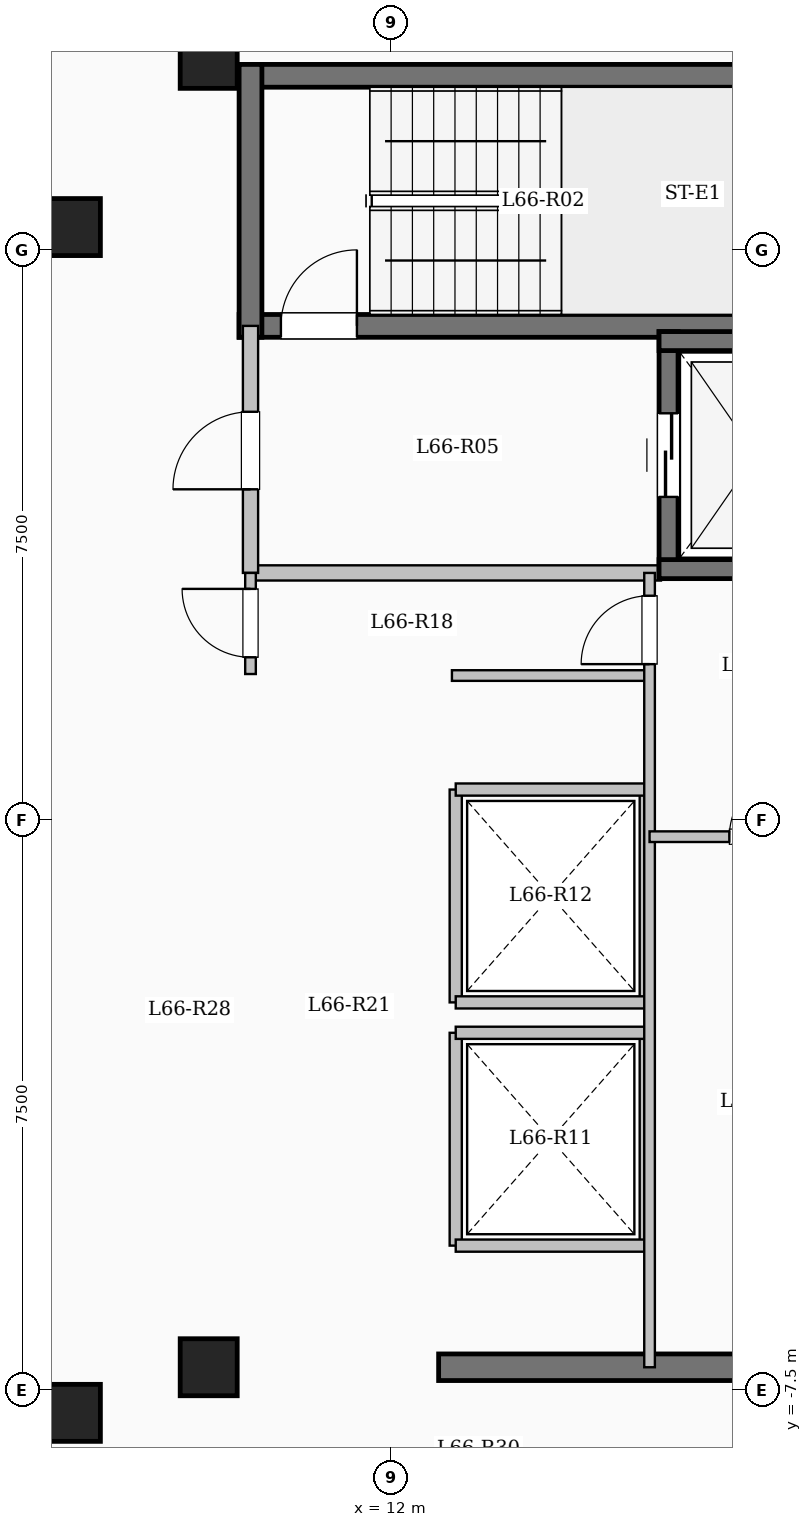
"""IFC4 building model, lengths in metres.
Left out: names, types, materials, properties, quantities, classifications, styles, units other than length and angle.
Written with IfcOpenShell. Run it as: python <this file> out.ifc"""

import sys

from ifc_helpers import new_model, si_unit, direction, frame, frame_2d, origin, origin_2d, place, context, subcontext, project, spatial, rectangle, extrude, element, fill, save


model = new_model("IFC4")
c1 = context("Model", 3, precision=1e-05, world=origin(), true_north=direction((0.0, 1.0)))
c2 = subcontext(c1, "Body", "Model", "MODEL_VIEW")
j1 = project(units=[si_unit("LENGTHUNIT", "METRE"), si_unit("PLANEANGLEUNIT", "RADIAN")], contexts=[c1])
p1 = place(None, origin())
s1 = spatial("IfcSite", under=j1, at=p1, CompositionType="ELEMENT")
p2 = place(p1, origin())
s2 = spatial("IfcBuilding", under=s1, at=p2, CompositionType="ELEMENT")
p3 = place(p2, frame((0.0, 0.0, 244.85)))
s3 = spatial("IfcBuildingStorey", under=s2, at=p3, CompositionType="ELEMENT", Elevation=244.85)
for number, where, z_axis, x_axis in (
    (1, (7.8, -7.8, 0.0), (0.0, 0.0, 1.0), (1.0, 0.0, 0.0)),
    (2, (7.8, 7.8, 0.0), (0.0, 0.0, 1.0), (1.0, 0.0, 0.0)),
    (3, (9.6, -7.2, 0.0), (0.0, 0.0, 1.0), (1.0, 0.0, 0.0)),
    (4, (9.6, 10.0, 0.0), (0.0, 0.0, 1.0), (1.0, 0.0, 0.0)),
):
    element("IfcColumn", number, at=place(p3, frame(where, z_axis=z_axis, x_axis=x_axis)), inside=s3, PredefinedType="COLUMN", context=c2, shape_type="SweptSolid", body=[
        extrude(rectangle(XDim=0.75, YDim=0.75, at=origin_2d()), origin(), (0.0, 0.0, 1.0), 3.35),
    ])
p4 = place(p3, frame((10.0, 9.79, 0.0), z_axis=(0.0, 0.0, 1.0), x_axis=(1.0, 0.0, 0.0)))
e5 = element("IfcWall", 5, at=p4, inside=s3, PredefinedType="SHEAR", context=c2, shape_type="SweptSolid", body=[
    extrude(rectangle(XDim=8.0, YDim=0.3, at=frame_2d((4.0, 0.0))), origin(), (0.0, 0.0, 1.0), 3.35),
])
p5 = place(p3, frame((10.0, 6.5, 0.0), z_axis=(0.0, 0.0, 1.0), x_axis=(1.0, 0.0, 0.0)))
e6 = element("IfcWall", 6, at=p5, inside=s3, PredefinedType="SHEAR", context=c2, shape_type="SweptSolid", body=[
    extrude(rectangle(XDim=8.0, YDim=0.3, at=frame_2d((4.0, 0.0))), origin(), (0.0, 0.0, 1.0), 3.35),
])
p6 = place(p5, frame((0.55, 0.0, 0.0)))
e7 = element("IfcOpeningElement", 7, at=p6, cuts=e6, PredefinedType="OPENING", context=c2, shape_type="SweptSolid", body=[
    extrude(rectangle(XDim=1.0, YDim=2.15, at=frame_2d((0.5, 1.075))), frame((0.0, 0.16, 0.0), z_axis=(0.0, -1.0, 0.0), x_axis=(1.0, 0.0, 0.0)), (0.0, 0.0, 1.0), 0.32),
])
p7 = place(p3, frame((10.15, 6.35, 0.0), z_axis=(0.0, 0.0, 1.0), x_axis=(0.0, 1.0, 0.0)))
e8 = element("IfcWall", 8, at=p7, inside=s3, PredefinedType="SHEAR", context=c2, shape_type="SweptSolid", body=[
    extrude(rectangle(XDim=3.59, YDim=0.3, at=frame_2d((1.795, 0.0))), origin(), (0.0, 0.0, 1.0), 3.35),
])
p8 = place(p3, frame((10.15, 3.25, 0.0), z_axis=(0.0, 0.0, 1.0), x_axis=(1.0, 0.0, 0.0)))
e9 = element("IfcWall", 9, at=p8, inside=s3, PredefinedType="SOLIDWALL", context=c2, shape_type="SweptSolid", body=[
    extrude(rectangle(XDim=5.4, YDim=0.2, at=frame_2d((2.7, 0.0))), origin(), (0.0, 0.0, 1.0), 3.1),
])
p9 = place(p3, frame((10.15, 3.25, 0.0), z_axis=(0.0, 0.0, 1.0), x_axis=(0.0, 1.0, 0.0)))
e10 = element("IfcWall", 10, at=p9, inside=s3, PredefinedType="SOLIDWALL", context=c2, shape_type="SweptSolid", body=[
    extrude(rectangle(XDim=3.25, YDim=0.2, at=frame_2d((1.625, 0.0))), origin(), (0.0, 0.0, 1.0), 3.1),
])
p10 = place(p9, frame((1.1, 0.0, 0.0)))
e11 = element("IfcOpeningElement", 11, at=p10, cuts=e10, PredefinedType="OPENING", context=c2, shape_type="SweptSolid", body=[
    extrude(rectangle(XDim=1.02, YDim=2.15, at=frame_2d((0.51, 1.075))), frame((0.0, 0.11, 0.0), z_axis=(0.0, -1.0, 0.0), x_axis=(1.0, 0.0, 0.0)), (0.0, 0.0, 1.0), 0.22),
])
p11 = place(p3, frame((15.65, 3.175, 0.0), z_axis=(0.0, 0.0, 1.0), x_axis=(0.0, 1.0, 0.0)))
e12 = element("IfcWall", 12, at=p11, inside=s3, PredefinedType="SHEAR", context=c2, shape_type="SweptSolid", body=[
    extrude(rectangle(XDim=3.25, YDim=0.25, at=frame_2d((1.625, 0.0))), origin(), (0.0, 0.0, 1.0), 3.35),
])
p12 = place(p11, frame((1.075, 0.0, 0.0)))
e13 = element("IfcOpeningElement", 13, at=p12, cuts=e12, PredefinedType="OPENING", context=c2, shape_type="SweptSolid", body=[
    extrude(rectangle(XDim=1.1, YDim=2.15, at=frame_2d((0.55, 1.075))), frame((0.0, 0.135, 0.0), z_axis=(0.0, -1.0, 0.0), x_axis=(1.0, 0.0, 0.0)), (0.0, 0.0, 1.0), 0.27),
])
for number, where, z_axis, x_axis in (
    (14, (15.525, 3.3, 0.0), (0.0, 0.0, 1.0), (1.0, 0.0, 0.0)),
    (15, (15.525, 6.3, 0.0), (0.0, 0.0, 1.0), (1.0, 0.0, 0.0)),
):
    element("IfcWall", number, at=place(p3, frame(where, z_axis=z_axis, x_axis=x_axis)), inside=s3, PredefinedType="SHEAR", context=c2, shape_type="SweptSolid", body=[
        extrude(rectangle(XDim=2.55, YDim=0.25, at=frame_2d((1.275, 0.0))), origin(), (0.0, 0.0, 1.0), 3.35),
    ])
for number, where, z_axis, x_axis in (
    (16, (12.85, -5.6, 0.0), (0.0, 0.0, 1.0), (0.0, 1.0, 0.0)),
    (17, (15.35, -5.6, 0.0), (0.0, 0.0, 1.0), (0.0, 1.0, 0.0)),
):
    element("IfcWall", number, at=place(p3, frame(where, z_axis=z_axis, x_axis=x_axis)), inside=s3, PredefinedType="SOLIDWALL", context=c2, shape_type="SweptSolid", body=[
        extrude(rectangle(XDim=2.8, YDim=0.16, at=frame_2d((1.4, 0.0))), origin(), (0.0, 0.0, 1.0), 3.1),
    ])
for number, where, z_axis, x_axis in (
    (18, (12.85, -5.6, 0.0), (0.0, 0.0, 1.0), (1.0, 0.0, 0.0)),
    (19, (12.85, -2.8, 0.0), (0.0, 0.0, 1.0), (1.0, 0.0, 0.0)),
):
    element("IfcWall", number, at=place(p3, frame(where, z_axis=z_axis, x_axis=x_axis)), inside=s3, PredefinedType="SOLIDWALL", context=c2, shape_type="SweptSolid", body=[
        extrude(rectangle(XDim=2.5, YDim=0.16, at=frame_2d((1.25, 0.0))), origin(), (0.0, 0.0, 1.0), 3.1),
    ])
for number, where, z_axis, x_axis in (
    (20, (12.85, -2.4, 0.0), (0.0, 0.0, 1.0), (0.0, 1.0, 0.0)),
    (21, (15.35, -2.4, 0.0), (0.0, 0.0, 1.0), (0.0, 1.0, 0.0)),
):
    element("IfcWall", number, at=place(p3, frame(where, z_axis=z_axis, x_axis=x_axis)), inside=s3, PredefinedType="SOLIDWALL", context=c2, shape_type="SweptSolid", body=[
        extrude(rectangle(XDim=2.8, YDim=0.16, at=frame_2d((1.4, 0.0))), origin(), (0.0, 0.0, 1.0), 3.1),
    ])
for number, where, z_axis, x_axis in (
    (22, (12.85, -2.4, 0.0), (0.0, 0.0, 1.0), (1.0, 0.0, 0.0)),
    (23, (12.85, 0.4, 0.0), (0.0, 0.0, 1.0), (1.0, 0.0, 0.0)),
):
    element("IfcWall", number, at=place(p3, frame(where, z_axis=z_axis, x_axis=x_axis)), inside=s3, PredefinedType="SOLIDWALL", context=c2, shape_type="SweptSolid", body=[
        extrude(rectangle(XDim=2.5, YDim=0.16, at=frame_2d((1.25, 0.0))), origin(), (0.0, 0.0, 1.0), 3.1),
    ])
p13 = place(p3, frame((12.625, -7.2, 0.0), z_axis=(0.0, 0.0, 1.0), x_axis=(1.0, 0.0, 0.0)))
e24 = element("IfcWall", 24, at=p13, inside=s3, PredefinedType="SHEAR", context=c2, shape_type="SweptSolid", body=[
    extrude(rectangle(XDim=6.0, YDim=0.35, at=frame_2d((3.0, 0.0))), origin(), (0.0, 0.0, 1.0), 3.35),
])
p14 = place(p3, frame((12.8, 1.9, 0.0), z_axis=(0.0, 0.0, 1.0), x_axis=(1.0, 0.0, 0.0)))
e25 = element("IfcWall", 25, at=p14, inside=s3, PredefinedType="PARTITIONING", context=c2, shape_type="SweptSolid", body=[
    extrude(rectangle(XDim=2.6, YDim=0.14, at=frame_2d((1.3, 0.0))), origin(), (0.0, 0.0, 1.0), 3.1),
])
p15 = place(p3, frame((10.15, 1.92, 0.0), z_axis=(0.0, 0.0, 1.0), x_axis=(0.0, 1.0, 0.0)))
e26 = element("IfcWall", 26, at=p15, inside=s3, PredefinedType="PARTITIONING", context=c2, shape_type="SweptSolid", body=[
    extrude(rectangle(XDim=1.33, YDim=0.14, at=frame_2d((0.665, 0.0))), origin(), (0.0, 0.0, 1.0), 3.1),
])
p16 = place(p15, frame((0.22, 0.0, 0.0)))
e27 = element("IfcOpeningElement", 27, at=p16, cuts=e26, PredefinedType="OPENING", context=c2, shape_type="SweptSolid", body=[
    extrude(rectangle(XDim=0.9, YDim=2.08, at=frame_2d((0.45, 1.04))), frame((0.0, 0.08, 0.0), z_axis=(0.0, -1.0, 0.0), x_axis=(1.0, 0.0, 0.0)), (0.0, 0.0, 1.0), 0.16),
])
p17 = place(p3, frame((15.4, -7.2, 0.0), z_axis=(0.0, 0.0, 1.0), x_axis=(0.0, 1.0, 0.0)))
e28 = element("IfcWall", 28, at=p17, inside=s3, PredefinedType="PARTITIONING", context=c2, shape_type="SweptSolid", body=[
    extrude(rectangle(XDim=10.45, YDim=0.14, at=frame_2d((5.225, 0.0))), origin(), (0.0, 0.0, 1.0), 3.1),
])
p18 = place(p17, frame((9.25, 0.0, 0.0)))
e29 = element("IfcOpeningElement", 29, at=p18, cuts=e28, PredefinedType="OPENING", context=c2, shape_type="SweptSolid", body=[
    extrude(rectangle(XDim=0.9, YDim=2.08, at=frame_2d((0.45, 1.04))), frame((0.0, 0.08, 0.0), z_axis=(0.0, -1.0, 0.0), x_axis=(1.0, 0.0, 0.0)), (0.0, 0.0, 1.0), 0.16),
])
p19 = place(p3, frame((15.4, -0.22, 0.0), z_axis=(0.0, 0.0, 1.0), x_axis=(1.0, 0.0, 0.0)))
e30 = element("IfcWall", 30, at=p19, inside=s3, PredefinedType="PARTITIONING", context=c2, shape_type="SweptSolid", body=[
    extrude(rectangle(XDim=3.05, YDim=0.14, at=frame_2d((1.525, 0.0))), origin(), (0.0, 0.0, 1.0), 3.1),
])
p20 = place(p19, frame((1.05, 0.0, 0.0)))
e31 = element("IfcOpeningElement", 31, at=p20, cuts=e30, PredefinedType="OPENING", context=c2, shape_type="SweptSolid", body=[
    extrude(rectangle(XDim=0.9, YDim=2.08, at=frame_2d((0.45, 1.04))), frame((0.0, 0.08, 0.0), z_axis=(0.0, -1.0, 0.0), x_axis=(1.0, 0.0, 0.0)), (0.0, 0.0, 1.0), 0.16),
])
p21 = place(p6, origin())
e32 = element("IfcDoor", 32, at=p21, inside=s3, OperationType="SINGLE_SWING_RIGHT", PredefinedType="DOOR", context=c2, shape_type="SweptSolid", body=[
    extrude(rectangle(XDim=1.0, YDim=2.15, at=frame_2d((0.5, 1.075))), frame((0.0, 0.025, 0.0), z_axis=(0.0, -1.0, 0.0), x_axis=(1.0, 0.0, 0.0)), (0.0, 0.0, 1.0), 0.05),
])
fill(e7, e32)
p22 = place(p10, origin())
e33 = element("IfcDoor", 33, at=p22, inside=s3, OperationType="SINGLE_SWING_LEFT", PredefinedType="DOOR", context=c2, shape_type="SweptSolid", body=[
    extrude(rectangle(XDim=1.02, YDim=2.15, at=frame_2d((0.51, 1.075))), frame((0.0, 0.025, 0.0), z_axis=(0.0, -1.0, 0.0), x_axis=(1.0, 0.0, 0.0)), (0.0, 0.0, 1.0), 0.05),
])
fill(e11, e33)
p23 = place(p12, origin())
e34 = element("IfcDoor", 34, at=p23, inside=s3, OperationType="SLIDING_TO_LEFT", PredefinedType="DOOR", context=c2, shape_type="SweptSolid", body=[
    extrude(rectangle(XDim=1.1, YDim=2.15, at=frame_2d((0.55, 1.075))), frame((0.0, 0.025, 0.0), z_axis=(0.0, -1.0, 0.0), x_axis=(1.0, 0.0, 0.0)), (0.0, 0.0, 1.0), 0.05),
])
fill(e13, e34)
p24 = place(p16, origin())
e35 = element("IfcDoor", 35, at=p24, inside=s3, OperationType="SINGLE_SWING_RIGHT", PredefinedType="DOOR", context=c2, shape_type="SweptSolid", body=[
    extrude(rectangle(XDim=0.9, YDim=2.08, at=frame_2d((0.45, 1.04))), frame((0.0, 0.025, 0.0), z_axis=(0.0, -1.0, 0.0), x_axis=(1.0, 0.0, 0.0)), (0.0, 0.0, 1.0), 0.05),
])
fill(e27, e35)
p25 = place(p18, origin())
e36 = element("IfcDoor", 36, at=p25, inside=s3, OperationType="SINGLE_SWING_LEFT", PredefinedType="DOOR", context=c2, shape_type="SweptSolid", body=[
    extrude(rectangle(XDim=0.9, YDim=2.08, at=frame_2d((0.45, 1.04))), frame((0.0, 0.025, 0.0), z_axis=(0.0, -1.0, 0.0), x_axis=(1.0, 0.0, 0.0)), (0.0, 0.0, 1.0), 0.05),
])
fill(e29, e36)
p26 = place(p20, origin())
e37 = element("IfcDoor", 37, at=p26, inside=s3, OperationType="SINGLE_SWING_RIGHT", PredefinedType="DOOR", context=c2, shape_type="SweptSolid", body=[
    extrude(rectangle(XDim=0.9, YDim=2.08, at=frame_2d((0.45, 1.04))), frame((0.0, 0.025, 0.0), z_axis=(0.0, -1.0, 0.0), x_axis=(1.0, 0.0, 0.0)), (0.0, 0.0, 1.0), 0.05),
])
fill(e31, e37)
save(model, sys.argv[1])
